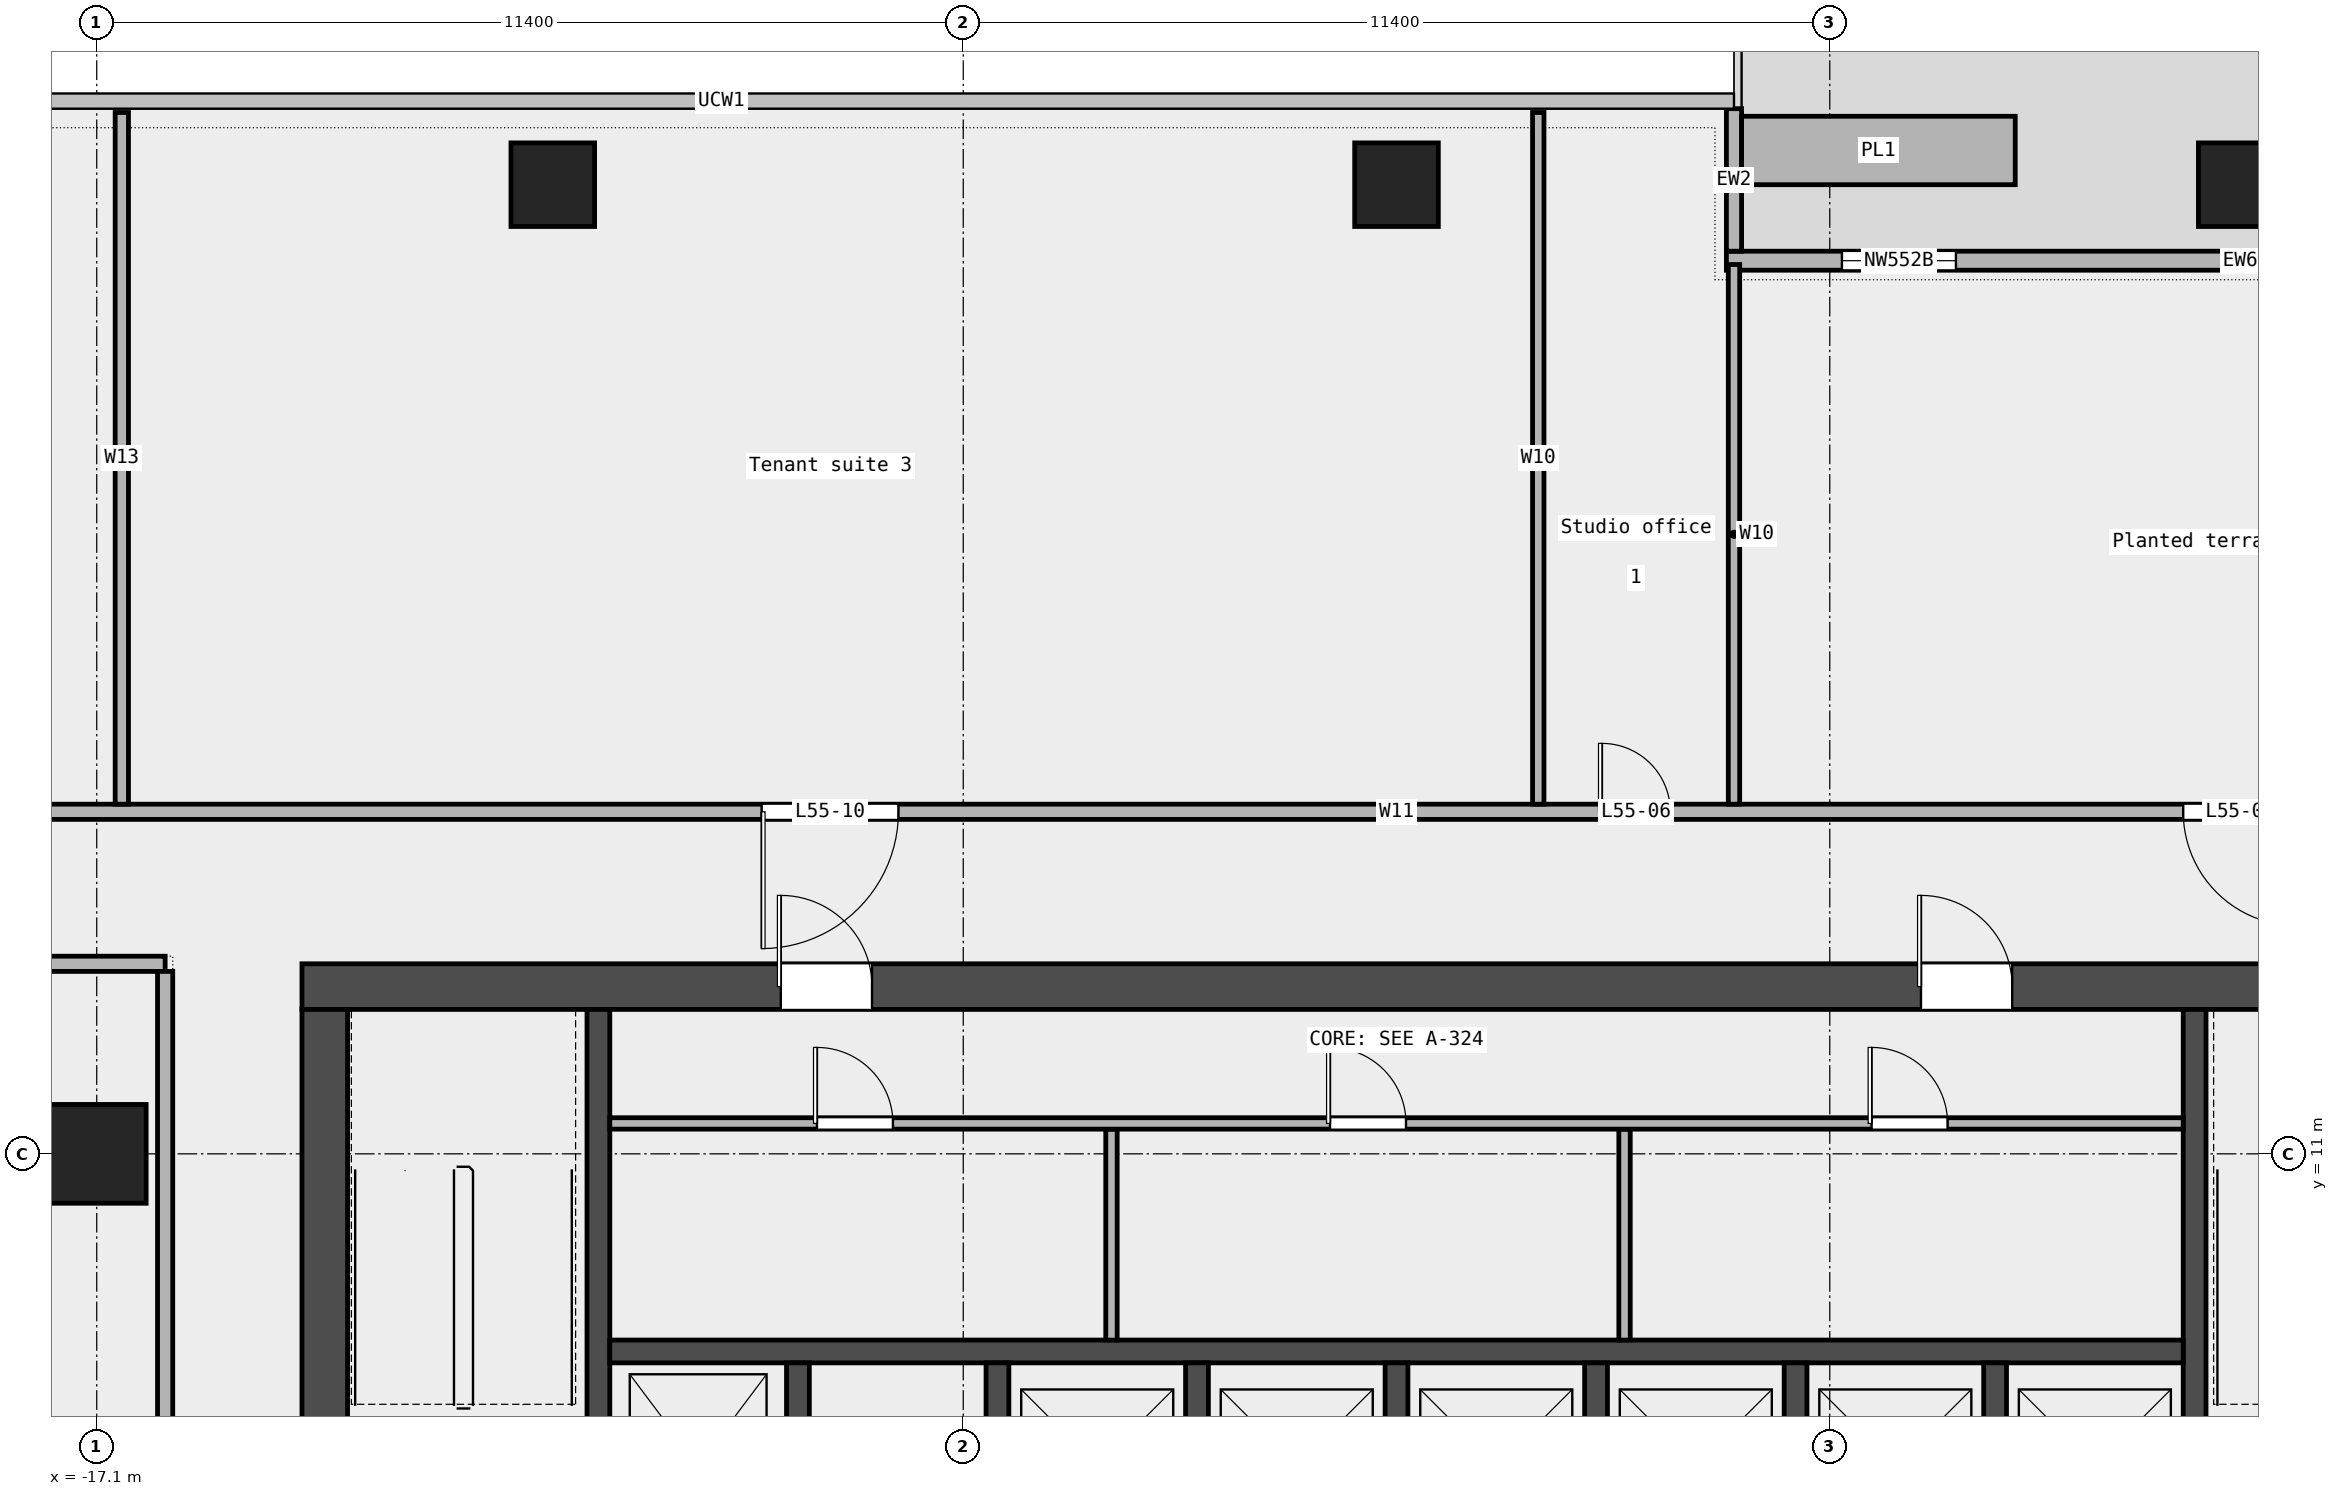
"""IFC4 building model, lengths in metres.
Left out: names, types, materials, properties, quantities, classifications, styles, units other than length and angle.
Written with IfcOpenShell. Run it as: python <this file> out.ifc"""

import sys

from ifc_helpers import new_model, si_unit, direction, frame, frame_2d, origin, origin_2d, place, context, subcontext, project, spatial, rectangle, extrude, element, fill, save


model = new_model("IFC4")
c1 = context("Model", 3, precision=1e-05, world=origin(), true_north=direction((0.0, 1.0)))
c2 = subcontext(c1, "Body", "Model", "MODEL_VIEW")
j1 = project(units=[si_unit("LENGTHUNIT", "METRE"), si_unit("PLANEANGLEUNIT", "RADIAN")], contexts=[c1])
p1 = place(None, origin())
s1 = spatial("IfcSite", under=j1, at=p1, CompositionType="ELEMENT")
p2 = place(p1, origin())
s2 = spatial("IfcBuilding", under=s1, at=p2, CompositionType="ELEMENT")
p3 = place(p2, frame((0.0, 0.0, 255.0)))
s3 = spatial("IfcBuildingStorey", under=s2, at=p3, CompositionType="ELEMENT", Elevation=255.0)
for number, where, z_axis, x_axis in (
    (1, (11.1, 23.75, 0.0), (0.0, 0.0, 1.0), (1.0, 0.0, 0.0)),
    (2, (0.0, 23.75, 0.0), (0.0, 0.0, 1.0), (1.0, 0.0, 0.0)),
    (3, (-11.1, 23.75, 0.0), (0.0, 0.0, 1.0), (1.0, 0.0, 0.0)),
):
    element("IfcColumn", number, at=place(p3, frame(where, z_axis=z_axis, x_axis=x_axis)), inside=s3, PredefinedType="COLUMN", context=c2, shape_type="SweptSolid", body=[
        extrude(rectangle(XDim=1.1, YDim=1.1, at=origin_2d()), origin(), (0.0, 0.0, 1.0), 3.4),
    ])
p4 = place(p3, frame((-17.1, 11.0, 0.0), z_axis=(0.0, 0.0, 1.0), x_axis=(1.0, 0.0, 0.0)))
e4 = element("IfcColumn", 4, at=p4, inside=s3, PredefinedType="COLUMN", context=c2, shape_type="SweptSolid", body=[
    extrude(rectangle(XDim=1.3, YDim=1.3, at=origin_2d()), origin(), (0.0, 0.0, 1.0), 3.4),
])
p5 = place(p3, frame((17.86, 22.75, 0.0), z_axis=(0.0, 0.0, 1.0), x_axis=(-1.0, 0.0, 0.0)))
e5 = element("IfcWall", 5, at=p5, inside=s3, PredefinedType="STANDARD", context=c2, shape_type="SweptSolid", body=[
    extrude(rectangle(XDim=13.52, YDim=0.25, at=frame_2d((6.76, 0.0))), origin(), (0.0, 0.0, 1.0), 3.4),
])
p6 = place(p5, frame((1.5, 0.0, 0.45)))
e6 = element("IfcOpeningElement", 6, at=p6, cuts=e5, PredefinedType="OPENING", context=c2, shape_type="SweptSolid", body=[
    extrude(rectangle(XDim=1.5, YDim=2.4, at=frame_2d((0.75, 1.2))), frame((0.0, 0.137, 0.0), z_axis=(0.0, -1.0, 0.0), x_axis=(1.0, 0.0, 0.0)), (0.0, 0.0, 1.0), 0.274),
])
p7 = place(p5, frame((4.0, 0.0, 0.0)))
e7 = element("IfcOpeningElement", 7, at=p7, cuts=e5, PredefinedType="OPENING", context=c2, shape_type="SweptSolid", body=[
    extrude(rectangle(XDim=1.8, YDim=2.4, at=frame_2d((0.9, 1.2))), frame((0.0, 0.137, 0.0), z_axis=(0.0, -1.0, 0.0), x_axis=(1.0, 0.0, 0.0)), (0.0, 0.0, 1.0), 0.274),
])
p8 = place(p5, frame((10.5, 0.0, 0.45)))
e8 = element("IfcOpeningElement", 8, at=p8, cuts=e5, PredefinedType="OPENING", context=c2, shape_type="SweptSolid", body=[
    extrude(rectangle(XDim=1.5, YDim=2.4, at=frame_2d((0.75, 1.2))), frame((0.0, 0.137, 0.0), z_axis=(0.0, -1.0, 0.0), x_axis=(1.0, 0.0, 0.0)), (0.0, 0.0, 1.0), 0.274),
])
p9 = place(p3, frame((4.44, 24.75, 0.0), z_axis=(0.0, 0.0, 1.0), x_axis=(0.0, -1.0, 0.0)))
e9 = element("IfcWall", 9, at=p9, inside=s3, PredefinedType="STANDARD", context=c2, shape_type="SweptSolid", body=[
    extrude(rectangle(XDim=1.875, YDim=0.2, at=frame_2d((0.938, 0.0))), origin(), (0.0, 0.0, 1.0), 3.4),
])
p10 = place(p3, frame((8.14, 24.2, 0.0), z_axis=(0.0, 0.0, 1.0), x_axis=(-1.0, 0.0, 0.0)))
e10 = element("IfcWall", 10, at=p10, inside=s3, PredefinedType="STANDARD", context=c2, shape_type="SweptSolid", body=[
    extrude(rectangle(XDim=3.6, YDim=0.9, at=frame_2d((1.8, 0.0))), origin(), (0.0, 0.0, 1.0), 0.7),
])
p11 = place(p3, frame((-26.15, 13.5, 0.0), z_axis=(0.0, 0.0, 1.0), x_axis=(1.0, 0.0, 0.0)))
e11 = element("IfcWall", 11, at=p11, inside=s3, PredefinedType="PARTITIONING", context=c2, shape_type="SweptSolid", body=[
    extrude(rectangle(XDim=9.95, YDim=0.2, at=frame_2d((4.975, 0.0))), origin(), (0.0, 0.0, 1.0), 3.4),
])
p12 = place(p3, frame((-28.15, 15.5, 0.0), z_axis=(0.0, 0.0, 1.0), x_axis=(1.0, 0.0, 0.0)))
e12 = element("IfcWall", 12, at=p12, inside=s3, PredefinedType="PARTITIONING", context=c2, shape_type="SweptSolid", body=[
    extrude(rectangle(XDim=56.3, YDim=0.2, at=frame_2d((28.15, 0.0))), origin(), (0.0, 0.0, 1.0), 3.4),
])
p13 = place(p12, frame((50.405, 0.0, 0.0)))
e13 = element("IfcOpeningElement", 13, at=p13, cuts=e12, PredefinedType="OPENING", context=c2, shape_type="SweptSolid", body=[
    extrude(rectangle(XDim=1.2, YDim=2.1, at=frame_2d((0.6, 1.05))), frame((0.0, 0.112, 0.0), z_axis=(0.0, -1.0, 0.0), x_axis=(1.0, 0.0, 0.0)), (0.0, 0.0, 1.0), 0.224),
])
p14 = place(p12, frame((38.5, 0.0, 0.0)))
e14 = element("IfcOpeningElement", 14, at=p14, cuts=e12, PredefinedType="OPENING", context=c2, shape_type="SweptSolid", body=[
    extrude(rectangle(XDim=1.5, YDim=2.1, at=frame_2d((0.75, 1.05))), frame((0.0, 0.112, 0.0), z_axis=(0.0, -1.0, 0.0), x_axis=(1.0, 0.0, 0.0)), (0.0, 0.0, 1.0), 0.224),
])
p15 = place(p12, frame((30.853, 0.0, 0.0)))
e15 = element("IfcOpeningElement", 15, at=p15, cuts=e12, PredefinedType="OPENING", context=c2, shape_type="SweptSolid", body=[
    extrude(rectangle(XDim=0.9, YDim=2.1, at=frame_2d((0.45, 1.05))), frame((0.0, 0.112, 0.0), z_axis=(0.0, -1.0, 0.0), x_axis=(1.0, 0.0, 0.0)), (0.0, 0.0, 1.0), 0.224),
])
p16 = place(p12, frame((19.798, 0.0, 0.0)))
e16 = element("IfcOpeningElement", 16, at=p16, cuts=e12, PredefinedType="OPENING", context=c2, shape_type="SweptSolid", body=[
    extrude(rectangle(XDim=1.8, YDim=2.1, at=frame_2d((0.9, 1.05))), frame((0.0, 0.112, 0.0), z_axis=(0.0, -1.0, 0.0), x_axis=(1.0, 0.0, 0.0)), (0.0, 0.0, 1.0), 0.224),
])
p17 = place(p12, frame((5.04, 0.0, 0.0)))
e17 = element("IfcOpeningElement", 17, at=p17, cuts=e12, PredefinedType="OPENING", context=c2, shape_type="SweptSolid", body=[
    extrude(rectangle(XDim=1.5, YDim=2.1, at=frame_2d((0.75, 1.05))), frame((0.0, 0.112, 0.0), z_axis=(0.0, -1.0, 0.0), x_axis=(1.0, 0.0, 0.0)), (0.0, 0.0, 1.0), 0.224),
])
p18 = place(p3, frame((-16.77, 15.6, 0.0), z_axis=(0.0, 0.0, 1.0), x_axis=(0.0, 1.0, 0.0)))
e18 = element("IfcWall", 18, at=p18, inside=s3, PredefinedType="PARTITIONING", context=c2, shape_type="SweptSolid", body=[
    extrude(rectangle(XDim=9.1, YDim=0.175, at=frame_2d((4.55, 0.0))), origin(), (0.0, 0.0, 1.0), 3.4),
])
p19 = place(p3, frame((-16.2, -7.1, 0.0), z_axis=(0.0, 0.0, 1.0), x_axis=(0.0, 1.0, 0.0)))
e19 = element("IfcWall", 19, at=p19, inside=s3, PredefinedType="PARTITIONING", context=c2, shape_type="SweptSolid", body=[
    extrude(rectangle(XDim=20.5, YDim=0.2, at=frame_2d((10.25, 0.0))), origin(), (0.0, 0.0, 1.0), 3.4),
])
p20 = place(p19, frame((13.05, 0.0, 0.0)))
e20 = element("IfcOpeningElement", 20, at=p20, cuts=e19, PredefinedType="OPENING", context=c2, shape_type="SweptSolid", body=[
    extrude(rectangle(XDim=1.5, YDim=2.1, at=frame_2d((0.75, 1.05))), frame((0.0, 0.112, 0.0), z_axis=(0.0, -1.0, 0.0), x_axis=(1.0, 0.0, 0.0)), (0.0, 0.0, 1.0), 0.224),
])
p21 = place(p3, frame((1.865, 15.6, 0.0), z_axis=(0.0, 0.0, 1.0), x_axis=(0.0, 1.0, 0.0)))
e21 = element("IfcWall", 21, at=p21, inside=s3, PredefinedType="PARTITIONING", context=c2, shape_type="SweptSolid", body=[
    extrude(rectangle(XDim=9.1, YDim=0.15, at=frame_2d((4.55, 0.0))), origin(), (0.0, 0.0, 1.0), 3.4),
])
p22 = place(p3, frame((4.44, 15.6, 0.0), z_axis=(0.0, 0.0, 1.0), x_axis=(0.0, 1.0, 0.0)))
e22 = element("IfcWall", 22, at=p22, inside=s3, PredefinedType="PARTITIONING", context=c2, shape_type="SweptSolid", body=[
    extrude(rectangle(XDim=7.1, YDim=0.15, at=frame_2d((3.55, 0.0))), origin(), (0.0, 0.0, 1.0), 3.4),
])
p23 = place(p3, frame((-14.4, 13.2, 0.0), z_axis=(0.0, 0.0, 1.0), x_axis=(1.0, 0.0, 0.0)))
e23 = element("IfcWall", 23, at=p23, inside=s3, PredefinedType="SHEAR", context=c2, shape_type="SweptSolid", body=[
    extrude(rectangle(XDim=28.8, YDim=0.6, at=frame_2d((14.4, 0.0))), origin(), (0.0, 0.0, 1.0), 3.7),
])
p24 = place(p23, frame((6.3, 0.0, 0.0)))
e24 = element("IfcOpeningElement", 24, at=p24, cuts=e23, PredefinedType="OPENING", context=c2, shape_type="SweptSolid", body=[
    extrude(rectangle(XDim=1.2, YDim=2.1, at=frame_2d((0.6, 1.05))), frame((0.0, 0.312, 0.0), z_axis=(0.0, -1.0, 0.0), x_axis=(1.0, 0.0, 0.0)), (0.0, 0.0, 1.0), 0.624),
])
p25 = place(p23, frame((21.3, 0.0, 0.0)))
e25 = element("IfcOpeningElement", 25, at=p25, cuts=e23, PredefinedType="OPENING", context=c2, shape_type="SweptSolid", body=[
    extrude(rectangle(XDim=1.2, YDim=2.1, at=frame_2d((0.6, 1.05))), frame((0.0, 0.312, 0.0), z_axis=(0.0, -1.0, 0.0), x_axis=(1.0, 0.0, 0.0)), (0.0, 0.0, 1.0), 0.624),
])
p26 = place(p3, frame((-14.1, -6.6, 0.0), z_axis=(0.0, 0.0, 1.0), x_axis=(0.0, 1.0, 0.0)))
e26 = element("IfcWall", 26, at=p26, inside=s3, PredefinedType="SHEAR", context=c2, shape_type="SweptSolid", body=[
    extrude(rectangle(XDim=19.5, YDim=0.6, at=frame_2d((9.75, 0.0))), origin(), (0.0, 0.0, 1.0), 3.7),
])
p27 = place(p26, frame((9.3, 0.0, 0.0)))
e27 = element("IfcOpeningElement", 27, at=p27, cuts=e26, PredefinedType="OPENING", context=c2, shape_type="SweptSolid", body=[
    extrude(rectangle(XDim=1.8, YDim=2.1, at=frame_2d((0.9, 1.05))), frame((0.0, 0.312, 0.0), z_axis=(0.0, -1.0, 0.0), x_axis=(1.0, 0.0, 0.0)), (0.0, 0.0, 1.0), 0.624),
])
for number, where, z_axis, x_axis in (
    (28, (-10.5, 5.25, 0.0), (0.0, 0.0, 1.0), (0.0, 1.0, 0.0)),
    (29, (10.5, 5.25, 0.0), (0.0, 0.0, 1.0), (0.0, 1.0, 0.0)),
):
    element("IfcWall", number, at=place(p3, frame(where, z_axis=z_axis, x_axis=x_axis)), inside=s3, PredefinedType="SHEAR", context=c2, shape_type="SweptSolid", body=[
        extrude(rectangle(XDim=7.65, YDim=0.3, at=frame_2d((3.825, 0.0))), origin(), (0.0, 0.0, 1.0), 3.7),
    ])
p28 = place(p3, frame((-10.35, 8.4, 0.0), z_axis=(0.0, 0.0, 1.0), x_axis=(1.0, 0.0, 0.0)))
e30 = element("IfcWall", 30, at=p28, inside=s3, PredefinedType="SOLIDWALL", context=c2, shape_type="SweptSolid", body=[
    extrude(rectangle(XDim=20.7, YDim=0.3, at=frame_2d((10.35, 0.0))), origin(), (0.0, 0.0, 1.0), 3.7),
])
for number, where, z_axis, x_axis in (
    (31, (-7.875, 5.55, 0.0), (0.0, 0.0, 1.0), (0.0, 1.0, 0.0)),
    (32, (-5.25, 5.55, 0.0), (0.0, 0.0, 1.0), (0.0, 1.0, 0.0)),
    (33, (-2.625, 5.55, 0.0), (0.0, 0.0, 1.0), (0.0, 1.0, 0.0)),
    (34, (0.0, 5.55, 0.0), (0.0, 0.0, 1.0), (0.0, 1.0, 0.0)),
    (35, (2.625, 5.55, 0.0), (0.0, 0.0, 1.0), (0.0, 1.0, 0.0)),
    (36, (5.25, 5.55, 0.0), (0.0, 0.0, 1.0), (0.0, 1.0, 0.0)),
    (37, (7.875, 5.55, 0.0), (0.0, 0.0, 1.0), (0.0, 1.0, 0.0)),
):
    element("IfcWall", number, at=place(p3, frame(where, z_axis=z_axis, x_axis=x_axis)), inside=s3, PredefinedType="SOLIDWALL", context=c2, shape_type="SweptSolid", body=[
        extrude(rectangle(XDim=2.7, YDim=0.3, at=frame_2d((1.35, 0.0))), origin(), (0.0, 0.0, 1.0), 3.7),
    ])
for number, where, z_axis, x_axis in (
    (38, (-3.75, 8.55, 0.0), (0.0, 0.0, 1.0), (0.0, 1.0, 0.0)),
    (39, (3.0, 8.55, 0.0), (0.0, 0.0, 1.0), (0.0, 1.0, 0.0)),
):
    element("IfcWall", number, at=place(p3, frame(where, z_axis=z_axis, x_axis=x_axis)), inside=s3, PredefinedType="PARTITIONING", context=c2, shape_type="SweptSolid", body=[
        extrude(rectangle(XDim=2.775, YDim=0.15, at=frame_2d((1.387, 0.0))), origin(), (0.0, 0.0, 1.0), 3.7),
    ])
p29 = place(p3, frame((-10.35, 11.4, 0.0), z_axis=(0.0, 0.0, 1.0), x_axis=(1.0, 0.0, 0.0)))
e40 = element("IfcWall", 40, at=p29, inside=s3, PredefinedType="PARTITIONING", context=c2, shape_type="SweptSolid", body=[
    extrude(rectangle(XDim=20.7, YDim=0.15, at=frame_2d((10.35, 0.0))), origin(), (0.0, 0.0, 1.0), 3.7),
])
p30 = place(p29, frame((2.725, 0.0, 0.0)))
e41 = element("IfcOpeningElement", 41, at=p30, cuts=e40, PredefinedType="OPENING", context=c2, shape_type="SweptSolid", body=[
    extrude(rectangle(XDim=1.0, YDim=2.1, at=frame_2d((0.5, 1.05))), frame((0.0, 0.087, 0.0), z_axis=(0.0, -1.0, 0.0), x_axis=(1.0, 0.0, 0.0)), (0.0, 0.0, 1.0), 0.174),
])
p31 = place(p29, frame((9.475, 0.0, 0.0)))
e42 = element("IfcOpeningElement", 42, at=p31, cuts=e40, PredefinedType="OPENING", context=c2, shape_type="SweptSolid", body=[
    extrude(rectangle(XDim=1.0, YDim=2.1, at=frame_2d((0.5, 1.05))), frame((0.0, 0.087, 0.0), z_axis=(0.0, -1.0, 0.0), x_axis=(1.0, 0.0, 0.0)), (0.0, 0.0, 1.0), 0.174),
])
p32 = place(p29, frame((16.6, 0.0, 0.0)))
e43 = element("IfcOpeningElement", 43, at=p32, cuts=e40, PredefinedType="OPENING", context=c2, shape_type="SweptSolid", body=[
    extrude(rectangle(XDim=1.0, YDim=2.1, at=frame_2d((0.5, 1.05))), frame((0.0, 0.087, 0.0), z_axis=(0.0, -1.0, 0.0), x_axis=(1.0, 0.0, 0.0)), (0.0, 0.0, 1.0), 0.174),
])
p33 = place(p8, origin())
e44 = element("IfcWindow", 44, at=p33, inside=s3, PartitioningType="SINGLE_PANEL", PredefinedType="WINDOW", context=c2, shape_type="SweptSolid", body=[
    extrude(rectangle(XDim=1.5, YDim=2.4, at=frame_2d((0.75, 1.2))), frame((0.0, 0.03, 0.0), z_axis=(0.0, -1.0, 0.0), x_axis=(1.0, 0.0, 0.0)), (0.0, 0.0, 1.0), 0.06),
])
fill(e8, e44)
p34 = place(p14, origin())
e45 = element("IfcDoor", 45, at=p34, inside=s3, OperationType="DOUBLE_DOOR_SINGLE_SWING", PredefinedType="DOOR", context=c2, shape_type="SweptSolid", body=[
    extrude(rectangle(XDim=1.5, YDim=2.1, at=frame_2d((0.75, 1.05))), frame((0.0, 0.025, 0.0), z_axis=(0.0, -1.0, 0.0), x_axis=(1.0, 0.0, 0.0)), (0.0, 0.0, 1.0), 0.05),
])
fill(e14, e45)
p35 = place(p15, origin())
e46 = element("IfcDoor", 46, at=p35, inside=s3, OperationType="SINGLE_SWING_LEFT", PredefinedType="DOOR", context=c2, shape_type="SweptSolid", body=[
    extrude(rectangle(XDim=0.9, YDim=2.1, at=frame_2d((0.45, 1.05))), frame((0.0, 0.025, 0.0), z_axis=(0.0, -1.0, 0.0), x_axis=(1.0, 0.0, 0.0)), (0.0, 0.0, 1.0), 0.05),
])
fill(e15, e46)
p36 = place(p16, origin())
e47 = element("IfcDoor", 47, at=p36, inside=s3, OperationType="DOUBLE_DOOR_SINGLE_SWING", PredefinedType="DOOR", context=c2, shape_type="SweptSolid", body=[
    extrude(rectangle(XDim=1.8, YDim=2.1, at=frame_2d((0.9, 1.05))), frame((0.0, 0.025, 0.0), z_axis=(0.0, -1.0, 0.0), x_axis=(1.0, 0.0, 0.0)), (0.0, 0.0, 1.0), 0.05),
])
fill(e16, e47)
p37 = place(p30, origin())
e48 = element("IfcDoor", 48, at=p37, inside=s3, OperationType="SINGLE_SWING_LEFT", PredefinedType="DOOR", context=c2, shape_type="SweptSolid", body=[
    extrude(rectangle(XDim=1.0, YDim=2.1, at=frame_2d((0.5, 1.05))), frame((0.0, 0.025, 0.0), z_axis=(0.0, -1.0, 0.0), x_axis=(1.0, 0.0, 0.0)), (0.0, 0.0, 1.0), 0.05),
])
fill(e41, e48)
p38 = place(p31, origin())
e49 = element("IfcDoor", 49, at=p38, inside=s3, OperationType="SINGLE_SWING_LEFT", PredefinedType="DOOR", context=c2, shape_type="SweptSolid", body=[
    extrude(rectangle(XDim=1.0, YDim=2.1, at=frame_2d((0.5, 1.05))), frame((0.0, 0.025, 0.0), z_axis=(0.0, -1.0, 0.0), x_axis=(1.0, 0.0, 0.0)), (0.0, 0.0, 1.0), 0.05),
])
fill(e42, e49)
p39 = place(p32, origin())
e50 = element("IfcDoor", 50, at=p39, inside=s3, OperationType="SINGLE_SWING_LEFT", PredefinedType="DOOR", context=c2, shape_type="SweptSolid", body=[
    extrude(rectangle(XDim=1.0, YDim=2.1, at=frame_2d((0.5, 1.05))), frame((0.0, 0.025, 0.0), z_axis=(0.0, -1.0, 0.0), x_axis=(1.0, 0.0, 0.0)), (0.0, 0.0, 1.0), 0.05),
])
fill(e43, e50)
p40 = place(p24, origin())
e51 = element("IfcDoor", 51, at=p40, inside=s3, OperationType="SINGLE_SWING_LEFT", PredefinedType="DOOR", context=c2, shape_type="SweptSolid", body=[
    extrude(rectangle(XDim=1.2, YDim=2.1, at=frame_2d((0.6, 1.05))), frame((0.0, 0.025, 0.0), z_axis=(0.0, -1.0, 0.0), x_axis=(1.0, 0.0, 0.0)), (0.0, 0.0, 1.0), 0.05),
])
fill(e24, e51)
p41 = place(p25, origin())
e52 = element("IfcDoor", 52, at=p41, inside=s3, OperationType="SINGLE_SWING_RIGHT", PredefinedType="DOOR", context=c2, shape_type="SweptSolid", body=[
    extrude(rectangle(XDim=1.2, YDim=2.1, at=frame_2d((0.6, 1.05))), frame((0.0, 0.025, 0.0), z_axis=(0.0, -1.0, 0.0), x_axis=(1.0, 0.0, 0.0)), (0.0, 0.0, 1.0), 0.05),
])
fill(e25, e52)
save(model, sys.argv[1])
